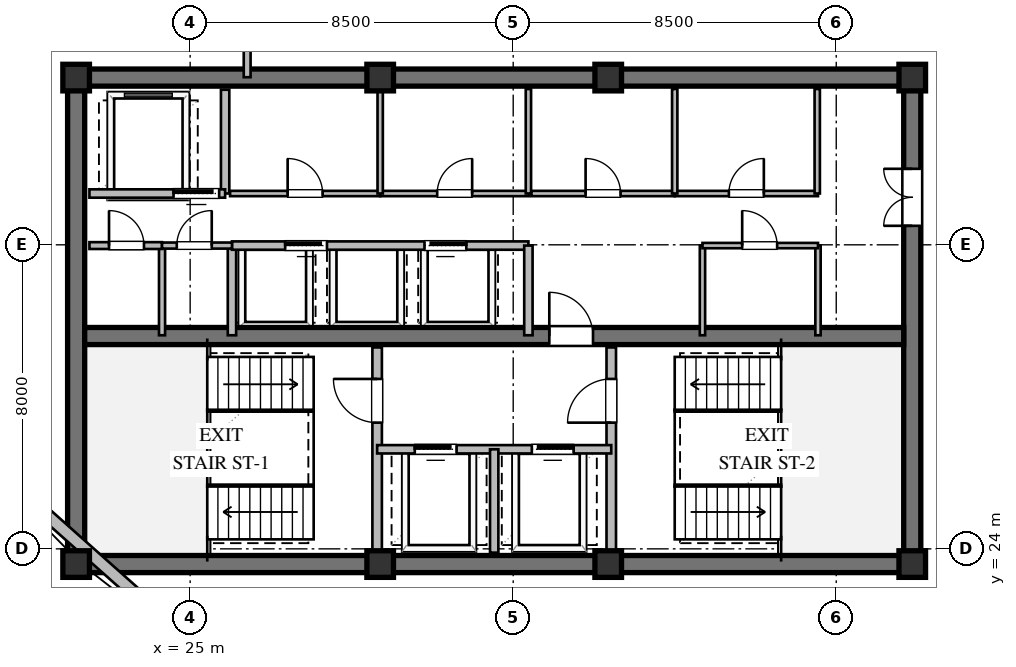
"""IFC4 building model, lengths in metres.
Left out: names, types, materials, properties, quantities, classifications, styles, units other than length and angle.
Written with IfcOpenShell. Run it as: python <this file> out.ifc"""

import sys

from ifc_helpers import new_model, si_unit, direction, frame, frame_2d, origin, origin_2d, place, context, subcontext, project, spatial, rectangle, extrude, element, fill, save


model = new_model("IFC4")
c1 = context("Model", 3, precision=1e-05, world=origin(), true_north=direction((0.0, 1.0)))
c2 = subcontext(c1, "Body", "Model", "MODEL_VIEW")
j1 = project(units=[si_unit("LENGTHUNIT", "METRE"), si_unit("PLANEANGLEUNIT", "RADIAN")], contexts=[c1])
p1 = place(None, origin())
s1 = spatial("IfcSite", under=j1, at=p1, CompositionType="ELEMENT")
p2 = place(p1, origin())
s2 = spatial("IfcBuilding", under=s1, at=p2, CompositionType="ELEMENT")
p3 = place(p2, frame((0.0, 0.0, 285.2)))
s3 = spatial("IfcBuildingStorey", under=s2, at=p3, CompositionType="ELEMENT", Elevation=285.2)
for number, where, z_axis, x_axis in (
    (1, (21.775, 23.6, 0.0), (0.0, 0.0, 1.0), (1.0, 0.0, 0.0)),
    (2, (21.775, 36.4, 0.0), (0.0, 0.0, 1.0), (1.0, 0.0, 0.0)),
):
    element("IfcWall", number, at=place(p3, frame(where, z_axis=z_axis, x_axis=x_axis)), inside=s3, PredefinedType="SHEAR", context=c2, shape_type="SweptSolid", body=[
        extrude(rectangle(XDim=22.45, YDim=0.45, at=frame_2d((11.225, 0.0))), origin(), (0.0, 0.0, 1.0), 3.56),
    ])
p4 = place(p3, frame((22.0, 23.825, 0.0), z_axis=(0.0, 0.0, 1.0), x_axis=(0.0, 1.0, 0.0)))
e3 = element("IfcWall", 3, at=p4, inside=s3, PredefinedType="SHEAR", context=c2, shape_type="SweptSolid", body=[
    extrude(rectangle(XDim=12.35, YDim=0.45, at=frame_2d((6.175, 0.0))), origin(), (0.0, 0.0, 1.0), 3.56),
])
p5 = place(p3, frame((44.0, 23.825, 0.0), z_axis=(0.0, 0.0, 1.0), x_axis=(0.0, 1.0, 0.0)))
e4 = element("IfcWall", 4, at=p5, inside=s3, PredefinedType="SHEAR", context=c2, shape_type="SweptSolid", body=[
    extrude(rectangle(XDim=12.35, YDim=0.45, at=frame_2d((6.175, 0.0))), origin(), (0.0, 0.0, 1.0), 3.56),
])
p6 = place(p5, frame((8.675, 0.0, 0.0)))
e5 = element("IfcOpeningElement", 5, at=p6, cuts=e4, PredefinedType="OPENING", context=c2, shape_type="SweptSolid", body=[
    extrude(rectangle(XDim=1.5, YDim=2.15, at=frame_2d((0.75, 1.075))), frame((0.0, 0.235, 0.0), z_axis=(0.0, -1.0, 0.0), x_axis=(1.0, 0.0, 0.0)), (0.0, 0.0, 1.0), 0.47),
])
p7 = place(p3, frame((22.225, 29.6, 0.0), z_axis=(0.0, 0.0, 1.0), x_axis=(1.0, 0.0, 0.0)))
e6 = element("IfcWall", 6, at=p7, inside=s3, PredefinedType="SHEAR", context=c2, shape_type="SweptSolid", body=[
    extrude(rectangle(XDim=21.55, YDim=0.45, at=frame_2d((10.775, 0.0))), origin(), (0.0, 0.0, 1.0), 3.56),
])
p8 = place(p7, frame((12.225, 0.0, 0.0)))
e7 = element("IfcOpeningElement", 7, at=p8, cuts=e6, PredefinedType="OPENING", context=c2, shape_type="SweptSolid", body=[
    extrude(rectangle(XDim=1.15, YDim=2.1, at=frame_2d((0.575, 1.05))), frame((0.0, 0.235, 0.0), z_axis=(0.0, -1.0, 0.0), x_axis=(1.0, 0.0, 0.0)), (0.0, 0.0, 1.0), 0.47),
])
for number, where, z_axis, x_axis in (
    (8, (22.0, 23.6, 0.0), (0.0, 0.0, 1.0), (1.0, 0.0, 0.0)),
    (9, (30.0, 23.6, 0.0), (0.0, 0.0, 1.0), (1.0, 0.0, 0.0)),
    (10, (36.0, 23.6, 0.0), (0.0, 0.0, 1.0), (1.0, 0.0, 0.0)),
    (11, (44.0, 23.6, 0.0), (0.0, 0.0, 1.0), (1.0, 0.0, 0.0)),
    (12, (44.0, 36.4, 0.0), (0.0, 0.0, 1.0), (1.0, 0.0, 0.0)),
    (13, (36.0, 36.4, 0.0), (0.0, 0.0, 1.0), (1.0, 0.0, 0.0)),
    (14, (30.0, 36.4, 0.0), (0.0, 0.0, 1.0), (1.0, 0.0, 0.0)),
    (15, (22.0, 36.4, 0.0), (0.0, 0.0, 1.0), (1.0, 0.0, 0.0)),
):
    element("IfcColumn", number, at=place(p3, frame(where, z_axis=z_axis, x_axis=x_axis)), inside=s3, PredefinedType="COLUMN", context=c2, shape_type="SweptSolid", body=[
        extrude(rectangle(XDim=0.7, YDim=0.7, at=origin_2d()), origin(), (0.0, 0.0, 1.0), 3.8),
    ])
p9 = place(p3, frame((24.648, 21.849, 0.0), z_axis=(0.0, 0.0, 1.0), x_axis=(-0.747068410291, 0.664747162721, 0.0)))
e16 = element("IfcWall", 16, at=p9, inside=s3, PredefinedType="STANDARD", context=c2, shape_type="SweptSolid", body=[
    extrude(rectangle(XDim=5.928, YDim=0.32, at=frame_2d((2.964, 0.0))), origin(), (0.0, 0.0, 1.0), 2.35),
])
p10 = place(p3, frame((29.92, 23.9, 0.0), z_axis=(0.0, 0.0, 1.0), x_axis=(0.0, 1.0, 0.0)))
e17 = element("IfcWall", 17, at=p10, inside=s3, PredefinedType="SOLIDWALL", context=c2, shape_type="SweptSolid", body=[
    extrude(rectangle(XDim=5.4, YDim=0.25, at=frame_2d((2.7, 0.0))), origin(), (0.0, 0.0, 1.0), 3.09),
])
p11 = place(p10, frame((3.421, 0.0, 0.0)))
e18 = element("IfcOpeningElement", 18, at=p11, cuts=e17, PredefinedType="OPENING", context=c2, shape_type="SweptSolid", body=[
    extrude(rectangle(XDim=1.15, YDim=2.1, at=frame_2d((0.575, 1.05))), frame((0.0, 0.135, 0.0), z_axis=(0.0, -1.0, 0.0), x_axis=(1.0, 0.0, 0.0)), (0.0, 0.0, 1.0), 0.27),
])
p12 = place(p3, frame((36.08, 23.9, 0.0), z_axis=(0.0, 0.0, 1.0), x_axis=(0.0, 1.0, 0.0)))
e19 = element("IfcWall", 19, at=p12, inside=s3, PredefinedType="SOLIDWALL", context=c2, shape_type="SweptSolid", body=[
    extrude(rectangle(XDim=5.4, YDim=0.25, at=frame_2d((2.7, 0.0))), origin(), (0.0, 0.0, 1.0), 3.56),
])
p13 = place(p12, frame((3.421, 0.0, 0.0)))
e20 = element("IfcOpeningElement", 20, at=p13, cuts=e19, PredefinedType="OPENING", context=c2, shape_type="SweptSolid", body=[
    extrude(rectangle(XDim=1.15, YDim=2.1, at=frame_2d((0.575, 1.05))), frame((0.0, 0.135, 0.0), z_axis=(0.0, -1.0, 0.0), x_axis=(1.0, 0.0, 0.0)), (0.0, 0.0, 1.0), 0.27),
])
p14 = place(p3, frame((29.92, 26.62, 0.0), z_axis=(0.0, 0.0, 1.0), x_axis=(1.0, 0.0, 0.0)))
e21 = element("IfcWall", 21, at=p14, inside=s3, PredefinedType="SOLIDWALL", context=c2, shape_type="SweptSolid", body=[
    extrude(rectangle(XDim=6.16, YDim=0.22, at=frame_2d((3.08, 0.0))), origin(), (0.0, 0.0, 1.0), 3.56),
])
p15 = place(p14, frame((0.99, 0.0, 0.0)))
e22 = element("IfcOpeningElement", 22, at=p15, cuts=e21, PredefinedType="OPENING", context=c2, shape_type="SweptSolid", body=[
    extrude(rectangle(XDim=1.1, YDim=2.1, at=frame_2d((0.55, 1.05))), frame((0.0, 0.12, 0.0), z_axis=(0.0, -1.0, 0.0), x_axis=(1.0, 0.0, 0.0)), (0.0, 0.0, 1.0), 0.24),
])
p16 = place(p14, frame((4.07, 0.0, 0.0)))
e23 = element("IfcOpeningElement", 23, at=p16, cuts=e21, PredefinedType="OPENING", context=c2, shape_type="SweptSolid", body=[
    extrude(rectangle(XDim=1.1, YDim=2.1, at=frame_2d((0.55, 1.05))), frame((0.0, 0.12, 0.0), z_axis=(0.0, -1.0, 0.0), x_axis=(1.0, 0.0, 0.0)), (0.0, 0.0, 1.0), 0.24),
])
p17 = place(p3, frame((33.0, 23.9, 0.0), z_axis=(0.0, 0.0, 1.0), x_axis=(0.0, 1.0, 0.0)))
e24 = element("IfcWall", 24, at=p17, inside=s3, PredefinedType="SOLIDWALL", context=c2, shape_type="SweptSolid", body=[
    extrude(rectangle(XDim=2.72, YDim=0.22, at=frame_2d((1.36, 0.0))), origin(), (0.0, 0.0, 1.0), 3.56),
])
p18 = place(p3, frame((25.92, 33.35, 0.0), z_axis=(0.0, 0.0, 1.0), x_axis=(0.0, 1.0, 0.0)))
e25 = element("IfcWall", 25, at=p18, inside=s3, PredefinedType="SOLIDWALL", context=c2, shape_type="SweptSolid", body=[
    extrude(rectangle(XDim=2.73, YDim=0.22, at=frame_2d((1.365, 0.0))), origin(), (0.0, 0.0, 1.0), 3.56),
])
p19 = place(p3, frame((22.35, 33.35, 0.0), z_axis=(0.0, 0.0, 1.0), x_axis=(1.0, 0.0, 0.0)))
e26 = element("IfcWall", 26, at=p19, inside=s3, PredefinedType="SOLIDWALL", context=c2, shape_type="SweptSolid", body=[
    extrude(rectangle(XDim=3.57, YDim=0.22, at=frame_2d((1.785, 0.0))), origin(), (0.0, 0.0, 1.0), 3.56),
])
p20 = place(p19, frame((2.213, 0.0, 0.0)))
e27 = element("IfcOpeningElement", 27, at=p20, cuts=e26, PredefinedType="OPENING", context=c2, shape_type="SweptSolid", body=[
    extrude(rectangle(XDim=1.2, YDim=2.1, at=frame_2d((0.6, 1.05))), frame((0.0, 0.12, 0.0), z_axis=(0.0, -1.0, 0.0), x_axis=(1.0, 0.0, 0.0)), (0.0, 0.0, 1.0), 0.24),
])
p21 = place(p3, frame((26.1, 29.62, 0.0), z_axis=(0.0, 0.0, 1.0), x_axis=(0.0, 1.0, 0.0)))
e28 = element("IfcWall", 28, at=p21, inside=s3, PredefinedType="SOLIDWALL", context=c2, shape_type="SweptSolid", body=[
    extrude(rectangle(XDim=2.36, YDim=0.22, at=frame_2d((1.18, 0.0))), origin(), (0.0, 0.0, 1.0), 3.56),
])
p22 = place(p3, frame((26.1, 31.98, 0.0), z_axis=(0.0, 0.0, 1.0), x_axis=(1.0, 0.0, 0.0)))
e29 = element("IfcWall", 29, at=p22, inside=s3, PredefinedType="SOLIDWALL", context=c2, shape_type="SweptSolid", body=[
    extrude(rectangle(XDim=7.8, YDim=0.22, at=frame_2d((3.9, 0.0))), origin(), (0.0, 0.0, 1.0), 3.56),
])
p23 = place(p22, frame((1.4, 0.0, 0.0)))
e30 = element("IfcOpeningElement", 30, at=p23, cuts=e29, PredefinedType="OPENING", context=c2, shape_type="SweptSolid", body=[
    extrude(rectangle(XDim=1.1, YDim=2.1, at=frame_2d((0.55, 1.05))), frame((0.0, 0.12, 0.0), z_axis=(0.0, -1.0, 0.0), x_axis=(1.0, 0.0, 0.0)), (0.0, 0.0, 1.0), 0.24),
])
p24 = place(p22, frame((5.066, 0.0, 0.0)))
e31 = element("IfcOpeningElement", 31, at=p24, cuts=e29, PredefinedType="OPENING", context=c2, shape_type="SweptSolid", body=[
    extrude(rectangle(XDim=1.1, YDim=2.1, at=frame_2d((0.55, 1.05))), frame((0.0, 0.12, 0.0), z_axis=(0.0, -1.0, 0.0), x_axis=(1.0, 0.0, 0.0)), (0.0, 0.0, 1.0), 0.24),
])
p25 = place(p3, frame((33.9, 29.62, 0.0), z_axis=(0.0, 0.0, 1.0), x_axis=(0.0, 1.0, 0.0)))
e32 = element("IfcWall", 32, at=p25, inside=s3, PredefinedType="SOLIDWALL", context=c2, shape_type="SweptSolid", body=[
    extrude(rectangle(XDim=2.36, YDim=0.22, at=frame_2d((1.18, 0.0))), origin(), (0.0, 0.0, 1.0), 3.56),
])
p26 = place(p3, frame((26.05, 33.35, 0.0), z_axis=(0.0, 0.0, 1.0), x_axis=(1.0, 0.0, 0.0)))
e33 = element("IfcWall", 33, at=p26, inside=s3, PredefinedType="PARTITIONING", context=c2, shape_type="SweptSolid", body=[
    extrude(rectangle(XDim=3.95, YDim=0.14, at=frame_2d((1.975, 0.0))), origin(), (0.0, 0.0, 1.0), 3.56),
])
p27 = place(p26, frame((1.515, 0.0, 0.0)))
e34 = element("IfcOpeningElement", 34, at=p27, cuts=e33, PredefinedType="OPENING", context=c2, shape_type="SweptSolid", body=[
    extrude(rectangle(XDim=0.92, YDim=2.1, at=frame_2d((0.46, 1.05))), frame((0.0, 0.08, 0.0), z_axis=(0.0, -1.0, 0.0), x_axis=(1.0, 0.0, 0.0)), (0.0, 0.0, 1.0), 0.16),
])
p28 = place(p3, frame((30.0, 33.35, 0.0), z_axis=(0.0, 0.0, 1.0), x_axis=(1.0, 0.0, 0.0)))
e35 = element("IfcWall", 35, at=p28, inside=s3, PredefinedType="PARTITIONING", context=c2, shape_type="SweptSolid", body=[
    extrude(rectangle(XDim=3.92, YDim=0.14, at=frame_2d((1.96, 0.0))), origin(), (0.0, 0.0, 1.0), 3.56),
])
p29 = place(p28, frame((1.5, 0.0, 0.0)))
e36 = element("IfcOpeningElement", 36, at=p29, cuts=e35, PredefinedType="OPENING", context=c2, shape_type="SweptSolid", body=[
    extrude(rectangle(XDim=0.92, YDim=2.1, at=frame_2d((0.46, 1.05))), frame((0.0, 0.08, 0.0), z_axis=(0.0, -1.0, 0.0), x_axis=(1.0, 0.0, 0.0)), (0.0, 0.0, 1.0), 0.16),
])
for number, where, z_axis, x_axis in (
    (37, (30.0, 33.35, 0.0), (0.0, 0.0, 1.0), (0.0, 1.0, 0.0)),
    (38, (33.9, 33.35, 0.0), (0.0, 0.0, 1.0), (0.0, 1.0, 0.0)),
):
    element("IfcWall", number, at=place(p3, frame(where, z_axis=z_axis, x_axis=x_axis)), inside=s3, PredefinedType="PARTITIONING", context=c2, shape_type="SweptSolid", body=[
        extrude(rectangle(XDim=2.75, YDim=0.14, at=frame_2d((1.375, 0.0))), origin(), (0.0, 0.0, 1.0), 3.56),
    ])
p30 = place(p3, frame((33.98, 33.35, 0.0), z_axis=(0.0, 0.0, 1.0), x_axis=(1.0, 0.0, 0.0)))
e39 = element("IfcWall", 39, at=p30, inside=s3, PredefinedType="PARTITIONING", context=c2, shape_type="SweptSolid", body=[
    extrude(rectangle(XDim=3.77, YDim=0.14, at=frame_2d((1.885, 0.0))), origin(), (0.0, 0.0, 1.0), 3.56),
])
p31 = place(p30, frame((1.425, 0.0, 0.0)))
e40 = element("IfcOpeningElement", 40, at=p31, cuts=e39, PredefinedType="OPENING", context=c2, shape_type="SweptSolid", body=[
    extrude(rectangle(XDim=0.92, YDim=2.1, at=frame_2d((0.46, 1.05))), frame((0.0, 0.08, 0.0), z_axis=(0.0, -1.0, 0.0), x_axis=(1.0, 0.0, 0.0)), (0.0, 0.0, 1.0), 0.16),
])
p32 = place(p3, frame((37.75, 33.35, 0.0), z_axis=(0.0, 0.0, 1.0), x_axis=(1.0, 0.0, 0.0)))
e41 = element("IfcWall", 41, at=p32, inside=s3, PredefinedType="PARTITIONING", context=c2, shape_type="SweptSolid", body=[
    extrude(rectangle(XDim=3.77, YDim=0.14, at=frame_2d((1.885, 0.0))), origin(), (0.0, 0.0, 1.0), 3.56),
])
p33 = place(p32, frame((1.425, 0.0, 0.0)))
e42 = element("IfcOpeningElement", 42, at=p33, cuts=e41, PredefinedType="OPENING", context=c2, shape_type="SweptSolid", body=[
    extrude(rectangle(XDim=0.92, YDim=2.1, at=frame_2d((0.46, 1.05))), frame((0.0, 0.08, 0.0), z_axis=(0.0, -1.0, 0.0), x_axis=(1.0, 0.0, 0.0)), (0.0, 0.0, 1.0), 0.16),
])
for number, where, z_axis, x_axis in (
    (43, (37.75, 33.35, 0.0), (0.0, 0.0, 1.0), (0.0, 1.0, 0.0)),
    (44, (41.5, 33.35, 0.0), (0.0, 0.0, 1.0), (0.0, 1.0, 0.0)),
):
    element("IfcWall", number, at=place(p3, frame(where, z_axis=z_axis, x_axis=x_axis)), inside=s3, PredefinedType="PARTITIONING", context=c2, shape_type="SweptSolid", body=[
        extrude(rectangle(XDim=2.75, YDim=0.14, at=frame_2d((1.375, 0.0))), origin(), (0.0, 0.0, 1.0), 3.56),
    ])
p34 = place(p3, frame((24.26, 29.62, 0.0), z_axis=(0.0, 0.0, 1.0), x_axis=(0.0, 1.0, 0.0)))
e45 = element("IfcWall", 45, at=p34, inside=s3, PredefinedType="PLUMBINGWALL", context=c2, shape_type="SweptSolid", body=[
    extrude(rectangle(XDim=2.36, YDim=0.16, at=frame_2d((1.18, 0.0))), origin(), (0.0, 0.0, 1.0), 3.56),
])
p35 = place(p3, frame((22.35, 31.98, 0.0), z_axis=(0.0, 0.0, 1.0), x_axis=(1.0, 0.0, 0.0)))
e46 = element("IfcWall", 46, at=p35, inside=s3, PredefinedType="PARTITIONING", context=c2, shape_type="SweptSolid", body=[
    extrude(rectangle(XDim=1.91, YDim=0.18, at=frame_2d((0.955, 0.0))), origin(), (0.0, 0.0, 1.0), 3.56),
])
p36 = place(p35, frame((0.515, 0.0, 0.0)))
e47 = element("IfcOpeningElement", 47, at=p36, cuts=e46, PredefinedType="OPENING", context=c2, shape_type="SweptSolid", body=[
    extrude(rectangle(XDim=0.92, YDim=2.1, at=frame_2d((0.46, 1.05))), frame((0.0, 0.1, 0.0), z_axis=(0.0, -1.0, 0.0), x_axis=(1.0, 0.0, 0.0)), (0.0, 0.0, 1.0), 0.2),
])
p37 = place(p3, frame((24.26, 31.98, 0.0), z_axis=(0.0, 0.0, 1.0), x_axis=(1.0, 0.0, 0.0)))
e48 = element("IfcWall", 48, at=p37, inside=s3, PredefinedType="PLUMBINGWALL", context=c2, shape_type="SweptSolid", body=[
    extrude(rectangle(XDim=1.84, YDim=0.16, at=frame_2d((0.92, 0.0))), origin(), (0.0, 0.0, 1.0), 3.56),
])
p38 = place(p37, frame((0.388, 0.0, 0.0)))
e49 = element("IfcOpeningElement", 49, at=p38, cuts=e48, PredefinedType="OPENING", context=c2, shape_type="SweptSolid", body=[
    extrude(rectangle(XDim=0.92, YDim=2.1, at=frame_2d((0.46, 1.05))), frame((0.0, 0.09, 0.0), z_axis=(0.0, -1.0, 0.0), x_axis=(1.0, 0.0, 0.0)), (0.0, 0.0, 1.0), 0.18),
])
for number, where, z_axis, x_axis in (
    (50, (38.48, 29.62, 0.0), (0.0, 0.0, 1.0), (0.0, 1.0, 0.0)),
    (51, (41.52, 29.62, 0.0), (0.0, 0.0, 1.0), (0.0, 1.0, 0.0)),
):
    element("IfcWall", number, at=place(p3, frame(where, z_axis=z_axis, x_axis=x_axis)), inside=s3, PredefinedType="PARTITIONING", context=c2, shape_type="SweptSolid", body=[
        extrude(rectangle(XDim=2.36, YDim=0.14, at=frame_2d((1.18, 0.0))), origin(), (0.0, 0.0, 1.0), 3.56),
    ])
p39 = place(p3, frame((38.48, 31.98, 0.0), z_axis=(0.0, 0.0, 1.0), x_axis=(1.0, 0.0, 0.0)))
e52 = element("IfcWall", 52, at=p39, inside=s3, PredefinedType="PARTITIONING", context=c2, shape_type="SweptSolid", body=[
    extrude(rectangle(XDim=3.04, YDim=0.14, at=frame_2d((1.52, 0.0))), origin(), (0.0, 0.0, 1.0), 3.56),
])
p40 = place(p39, frame((1.045, 0.0, 0.0)))
e53 = element("IfcOpeningElement", 53, at=p40, cuts=e52, PredefinedType="OPENING", context=c2, shape_type="SweptSolid", body=[
    extrude(rectangle(XDim=0.92, YDim=2.1, at=frame_2d((0.46, 1.05))), frame((0.0, 0.08, 0.0), z_axis=(0.0, -1.0, 0.0), x_axis=(1.0, 0.0, 0.0)), (0.0, 0.0, 1.0), 0.16),
])
p41 = place(p3, frame((26.5, 36.41, 0.0), z_axis=(0.0, 0.0, 1.0), x_axis=(0.0, 1.0, 0.0)))
e54 = element("IfcWall", 54, at=p41, inside=s3, PredefinedType="PARTITIONING", context=c2, shape_type="SweptSolid", body=[
    extrude(rectangle(XDim=15.12, YDim=0.18, at=frame_2d((7.56, 0.0))), origin(), (0.0, 0.0, 1.0), 3.56),
])
p42 = place(p41, frame((8.178, 0.0, 0.0)))
e55 = element("IfcOpeningElement", 55, at=p42, cuts=e54, PredefinedType="OPENING", context=c2, shape_type="SweptSolid", body=[
    extrude(rectangle(XDim=1.1, YDim=2.1, at=frame_2d((0.55, 1.05))), frame((0.0, 0.1, 0.0), z_axis=(0.0, -1.0, 0.0), x_axis=(1.0, 0.0, 0.0)), (0.0, 0.0, 1.0), 0.2),
])
p43 = place(p11, origin())
e56 = element("IfcDoor", 56, at=p43, inside=s3, OperationType="SINGLE_SWING_RIGHT", PredefinedType="DOOR", context=c2, shape_type="SweptSolid", body=[
    extrude(rectangle(XDim=1.15, YDim=2.1, at=frame_2d((0.575, 1.05))), frame((0.0, 0.025, 0.0), z_axis=(0.0, -1.0, 0.0), x_axis=(1.0, 0.0, 0.0)), (0.0, 0.0, 1.0), 0.05),
])
fill(e18, e56)
p44 = place(p13, origin())
e57 = element("IfcDoor", 57, at=p44, inside=s3, OperationType="SINGLE_SWING_LEFT", PredefinedType="DOOR", context=c2, shape_type="SweptSolid", body=[
    extrude(rectangle(XDim=1.15, YDim=2.1, at=frame_2d((0.575, 1.05))), frame((0.0, 0.025, 0.0), z_axis=(0.0, -1.0, 0.0), x_axis=(1.0, 0.0, 0.0)), (0.0, 0.0, 1.0), 0.05),
])
fill(e20, e57)
p45 = place(p15, origin())
e58 = element("IfcDoor", 58, at=p45, inside=s3, OperationType="SLIDING_TO_LEFT", PredefinedType="DOOR", context=c2, shape_type="SweptSolid", body=[
    extrude(rectangle(XDim=1.1, YDim=2.1, at=frame_2d((0.55, 1.05))), frame((0.0, 0.025, 0.0), z_axis=(0.0, -1.0, 0.0), x_axis=(1.0, 0.0, 0.0)), (0.0, 0.0, 1.0), 0.05),
])
fill(e22, e58)
p46 = place(p16, origin())
e59 = element("IfcDoor", 59, at=p46, inside=s3, OperationType="SLIDING_TO_RIGHT", PredefinedType="DOOR", context=c2, shape_type="SweptSolid", body=[
    extrude(rectangle(XDim=1.1, YDim=2.1, at=frame_2d((0.55, 1.05))), frame((0.0, 0.025, 0.0), z_axis=(0.0, -1.0, 0.0), x_axis=(1.0, 0.0, 0.0)), (0.0, 0.0, 1.0), 0.05),
])
fill(e23, e59)
p47 = place(p8, origin())
e60 = element("IfcDoor", 60, at=p47, inside=s3, OperationType="SINGLE_SWING_LEFT", PredefinedType="DOOR", context=c2, shape_type="SweptSolid", body=[
    extrude(rectangle(XDim=1.15, YDim=2.1, at=frame_2d((0.575, 1.05))), frame((0.0, 0.025, 0.0), z_axis=(0.0, -1.0, 0.0), x_axis=(1.0, 0.0, 0.0)), (0.0, 0.0, 1.0), 0.05),
])
fill(e7, e60)
p48 = place(p6, origin())
e61 = element("IfcDoor", 61, at=p48, inside=s3, OperationType="DOUBLE_DOOR_SINGLE_SWING", PredefinedType="DOOR", context=c2, shape_type="SweptSolid", body=[
    extrude(rectangle(XDim=1.5, YDim=2.15, at=frame_2d((0.75, 1.075))), frame((0.0, 0.025, 0.0), z_axis=(0.0, -1.0, 0.0), x_axis=(1.0, 0.0, 0.0)), (0.0, 0.0, 1.0), 0.05),
])
fill(e5, e61)
p49 = place(p20, origin())
e62 = element("IfcDoor", 62, at=p49, inside=s3, OperationType="SLIDING_TO_LEFT", PredefinedType="DOOR", context=c2, shape_type="SweptSolid", body=[
    extrude(rectangle(XDim=1.2, YDim=2.1, at=frame_2d((0.6, 1.05))), frame((0.0, 0.025, 0.0), z_axis=(0.0, -1.0, 0.0), x_axis=(1.0, 0.0, 0.0)), (0.0, 0.0, 1.0), 0.05),
])
fill(e27, e62)
p50 = place(p23, origin())
e63 = element("IfcDoor", 63, at=p50, inside=s3, OperationType="SLIDING_TO_LEFT", PredefinedType="DOOR", context=c2, shape_type="SweptSolid", body=[
    extrude(rectangle(XDim=1.1, YDim=2.1, at=frame_2d((0.55, 1.05))), frame((0.0, 0.025, 0.0), z_axis=(0.0, -1.0, 0.0), x_axis=(1.0, 0.0, 0.0)), (0.0, 0.0, 1.0), 0.05),
])
fill(e30, e63)
p51 = place(p24, origin())
e64 = element("IfcDoor", 64, at=p51, inside=s3, OperationType="SLIDING_TO_RIGHT", PredefinedType="DOOR", context=c2, shape_type="SweptSolid", body=[
    extrude(rectangle(XDim=1.1, YDim=2.1, at=frame_2d((0.55, 1.05))), frame((0.0, 0.025, 0.0), z_axis=(0.0, -1.0, 0.0), x_axis=(1.0, 0.0, 0.0)), (0.0, 0.0, 1.0), 0.05),
])
fill(e31, e64)
p52 = place(p27, origin())
e65 = element("IfcDoor", 65, at=p52, inside=s3, OperationType="SINGLE_SWING_LEFT", PredefinedType="DOOR", context=c2, shape_type="SweptSolid", body=[
    extrude(rectangle(XDim=0.92, YDim=2.1, at=frame_2d((0.46, 1.05))), frame((0.0, 0.025, 0.0), z_axis=(0.0, -1.0, 0.0), x_axis=(1.0, 0.0, 0.0)), (0.0, 0.0, 1.0), 0.05),
])
fill(e34, e65)
p53 = place(p29, origin())
e66 = element("IfcDoor", 66, at=p53, inside=s3, OperationType="SINGLE_SWING_RIGHT", PredefinedType="DOOR", context=c2, shape_type="SweptSolid", body=[
    extrude(rectangle(XDim=0.92, YDim=2.1, at=frame_2d((0.46, 1.05))), frame((0.0, 0.025, 0.0), z_axis=(0.0, -1.0, 0.0), x_axis=(1.0, 0.0, 0.0)), (0.0, 0.0, 1.0), 0.05),
])
fill(e36, e66)
p54 = place(p31, origin())
e67 = element("IfcDoor", 67, at=p54, inside=s3, OperationType="SINGLE_SWING_LEFT", PredefinedType="DOOR", context=c2, shape_type="SweptSolid", body=[
    extrude(rectangle(XDim=0.92, YDim=2.1, at=frame_2d((0.46, 1.05))), frame((0.0, 0.025, 0.0), z_axis=(0.0, -1.0, 0.0), x_axis=(1.0, 0.0, 0.0)), (0.0, 0.0, 1.0), 0.05),
])
fill(e40, e67)
p55 = place(p33, origin())
e68 = element("IfcDoor", 68, at=p55, inside=s3, OperationType="SINGLE_SWING_RIGHT", PredefinedType="DOOR", context=c2, shape_type="SweptSolid", body=[
    extrude(rectangle(XDim=0.92, YDim=2.1, at=frame_2d((0.46, 1.05))), frame((0.0, 0.025, 0.0), z_axis=(0.0, -1.0, 0.0), x_axis=(1.0, 0.0, 0.0)), (0.0, 0.0, 1.0), 0.05),
])
fill(e42, e68)
p56 = place(p36, origin())
e69 = element("IfcDoor", 69, at=p56, inside=s3, OperationType="SINGLE_SWING_LEFT", PredefinedType="DOOR", context=c2, shape_type="SweptSolid", body=[
    extrude(rectangle(XDim=0.92, YDim=2.1, at=frame_2d((0.46, 1.05))), frame((0.0, 0.025, 0.0), z_axis=(0.0, -1.0, 0.0), x_axis=(1.0, 0.0, 0.0)), (0.0, 0.0, 1.0), 0.05),
])
fill(e47, e69)
p57 = place(p38, origin())
e70 = element("IfcDoor", 70, at=p57, inside=s3, OperationType="SINGLE_SWING_RIGHT", PredefinedType="DOOR", context=c2, shape_type="SweptSolid", body=[
    extrude(rectangle(XDim=0.92, YDim=2.1, at=frame_2d((0.46, 1.05))), frame((0.0, 0.025, 0.0), z_axis=(0.0, -1.0, 0.0), x_axis=(1.0, 0.0, 0.0)), (0.0, 0.0, 1.0), 0.05),
])
fill(e49, e70)
p58 = place(p40, origin())
e71 = element("IfcDoor", 71, at=p58, inside=s3, OperationType="SINGLE_SWING_LEFT", PredefinedType="DOOR", context=c2, shape_type="SweptSolid", body=[
    extrude(rectangle(XDim=0.92, YDim=2.1, at=frame_2d((0.46, 1.05))), frame((0.0, 0.025, 0.0), z_axis=(0.0, -1.0, 0.0), x_axis=(1.0, 0.0, 0.0)), (0.0, 0.0, 1.0), 0.05),
])
fill(e53, e71)
save(model, sys.argv[1])
